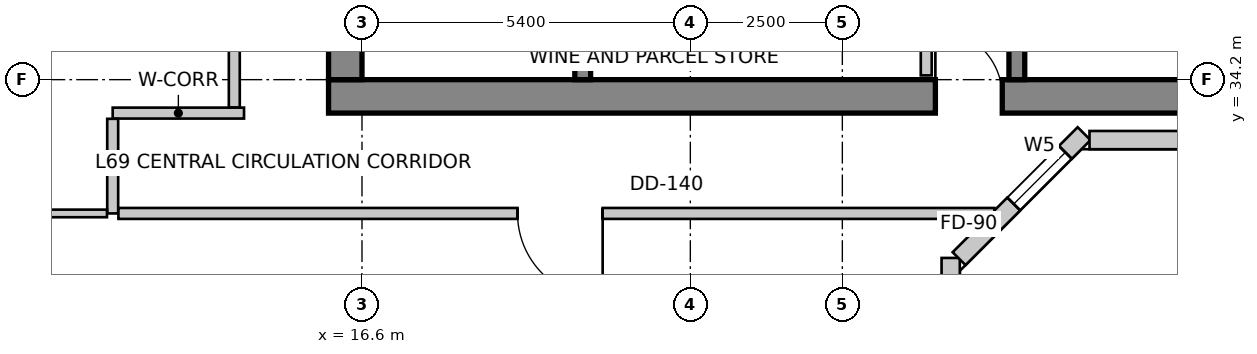
"""IFC4 building model, lengths in metres.
Left out: names, types, materials, properties, quantities, classifications, styles, units other than length and angle.
Written with IfcOpenShell. Run it as: python <this file> out.ifc"""

import sys

from ifc_helpers import new_model, si_unit, direction, frame, frame_2d, origin, place, context, subcontext, project, spatial, rectangle, extrude, source, transform, mapped, element, fill, save


model = new_model("IFC4")
c1 = context("Model", 3, precision=1e-05, world=origin(), true_north=direction((0.0, 1.0)))
c2 = subcontext(c1, "Body", "Model", "MODEL_VIEW")
j1 = project(units=[si_unit("LENGTHUNIT", "METRE"), si_unit("PLANEANGLEUNIT", "RADIAN")], contexts=[c1])
p1 = place(None, origin())
s1 = spatial("IfcSite", under=j1, at=p1, CompositionType="ELEMENT")
p2 = place(p1, origin())
s2 = spatial("IfcBuilding", under=s1, at=p2, CompositionType="ELEMENT")
p3 = place(p2, frame((0.0, 0.0, 270.9)))
s3 = spatial("IfcBuildingStorey", under=s2, at=p3, CompositionType="ELEMENT", Elevation=270.9)
p4 = place(p3, frame((16.05, 33.925, 0.0), z_axis=(0.0, 0.0, 1.0), x_axis=(1.0, 0.0, 0.0)))
e1 = element("IfcWall", 1, at=p4, inside=s3, PredefinedType="SHEAR", context=c2, shape_type="SweptSolid", body=[
    extrude(rectangle(XDim=15.5, YDim=0.55, at=frame_2d((7.75, 0.0))), origin(), (0.0, 0.0, 1.0), 3.6),
])
m1 = source(origin(), c2, "Body", "SweptSolid", [
    extrude(rectangle(XDim=1.1, YDim=2.15, at=frame_2d((0.55, 1.075))), frame((0.0, 0.285, 0.0), z_axis=(0.0, -1.0, 0.0), x_axis=(1.0, 0.0, 0.0)), (0.0, 0.0, 1.0), 0.57),
])
p5 = place(p4, frame((9.98, 0.0, 0.0)))
e2 = element("IfcOpeningElement", 2, at=p5, cuts=e1, PredefinedType="OPENING", context=c2, shape_type="MappedRepresentation", body=[
    mapped(m1, transform((0.0, 0.0, 0.0), scale=1.0)),
])
p6 = place(p3, frame((16.325, 34.2, 0.0), z_axis=(0.0, 0.0, 1.0), x_axis=(0.0, 1.0, 0.0)))
e3 = element("IfcWall", 3, at=p6, inside=s3, PredefinedType="SHEAR", context=c2, shape_type="SweptSolid", body=[
    extrude(rectangle(XDim=11.4, YDim=0.55, at=frame_2d((5.7, 0.0))), origin(), (0.0, 0.0, 1.0), 3.6),
])
p7 = place(p6, frame((7.15, 0.0, 0.0)))
e4 = element("IfcOpeningElement", 4, at=p7, cuts=e3, PredefinedType="OPENING", context=c2, shape_type="MappedRepresentation", body=[
    mapped(m1, transform((0.0, 0.0, 0.0), scale=1.0)),
])
p8 = place(p3, frame((20.23, 34.2, 0.0), z_axis=(0.0, 0.0, 1.0), x_axis=(0.0, 1.0, 0.0)))
e5 = element("IfcWall", 5, at=p8, inside=s3, PredefinedType="SHEAR", context=c2, shape_type="SweptSolid", body=[
    extrude(rectangle(XDim=9.06, YDim=0.26, at=frame_2d((4.53, 0.0))), origin(), (0.0, 0.0, 1.0), 3.6),
])
m2 = source(origin(), c2, "Body", "SweptSolid", [
    extrude(rectangle(XDim=1.1, YDim=2.15, at=frame_2d((0.55, 1.075))), frame((0.0, 0.14, 0.0), z_axis=(0.0, -1.0, 0.0), x_axis=(1.0, 0.0, 0.0)), (0.0, 0.0, 1.0), 0.28),
])
p9 = place(p8, frame((7.45, 0.0, 0.0)))
e6 = element("IfcOpeningElement", 6, at=p9, cuts=e5, PredefinedType="OPENING", context=c2, shape_type="MappedRepresentation", body=[
    mapped(m2, transform((0.0, 0.0, 0.0), scale=1.0)),
])
p10 = place(p3, frame((27.37, 34.2, 0.0), z_axis=(0.0, 0.0, 1.0), x_axis=(0.0, 1.0, 0.0)))
e7 = element("IfcWall", 7, at=p10, inside=s3, PredefinedType="SHEAR", context=c2, shape_type="SweptSolid", body=[
    extrude(rectangle(XDim=9.06, YDim=0.26, at=frame_2d((4.53, 0.0))), origin(), (0.0, 0.0, 1.0), 3.6),
])
p11 = place(p10, frame((7.45, 0.0, 0.0)))
e8 = element("IfcOpeningElement", 8, at=p11, cuts=e7, PredefinedType="OPENING", context=c2, shape_type="MappedRepresentation", body=[
    mapped(m2, transform((0.0, 0.0, 0.0), scale=1.0)),
])
p12 = place(p3, frame((26.282, 21.557, 0.0), z_axis=(0.0, 0.0, 1.0), x_axis=(0.0, 1.0, 0.0)))
e9 = element("IfcWall", 9, at=p12, inside=s3, PredefinedType="SOLIDWALL", context=c2, shape_type="SweptSolid", body=[
    extrude(rectangle(XDim=9.711, YDim=0.3, at=frame_2d((4.855, 0.0))), origin(), (0.0, 0.0, 1.0), 3.35),
])
m3 = source(origin(), c2, "Body", "SweptSolid", [
    extrude(rectangle(XDim=2.1, YDim=2.0, at=frame_2d((1.05, 1.0))), frame((0.0, 0.16, 0.0), z_axis=(0.0, -1.0, 0.0), x_axis=(1.0, 0.0, 0.0)), (0.0, 0.0, 1.0), 0.32),
])
p13 = place(p12, frame((0.504, 0.0, 0.85)))
e10 = element("IfcOpeningElement", 10, at=p13, cuts=e9, PredefinedType="OPENING", context=c2, shape_type="MappedRepresentation", body=[
    mapped(m3, transform((0.0, 0.0, 0.0), scale=1.0)),
])
p14 = place(p12, frame((5.259, 0.0, 0.85)))
e11 = element("IfcOpeningElement", 11, at=p14, cuts=e9, PredefinedType="OPENING", context=c2, shape_type="MappedRepresentation", body=[
    mapped(m3, transform((0.0, 0.0, 0.0), scale=1.0)),
])
p15 = place(p3, frame((26.42, 31.256, 0.0), z_axis=(0.0, 0.0, 1.0), x_axis=(0.707106781187, 0.707106781187, 0.0)))
e12 = element("IfcWall", 12, at=p15, inside=s3, PredefinedType="SOLIDWALL", context=c2, shape_type="SweptSolid", body=[
    extrude(rectangle(XDim=2.907, YDim=0.3, at=frame_2d((1.454, 0.0))), origin(), (0.0, 0.0, 1.0), 3.35),
])
m4 = source(origin(), c2, "Body", "SweptSolid", [
    extrude(rectangle(XDim=1.2, YDim=1.6, at=frame_2d((0.6, 0.8))), frame((0.0, 0.16, 0.0), z_axis=(0.0, -1.0, 0.0), x_axis=(1.0, 0.0, 0.0)), (0.0, 0.0, 1.0), 0.32),
])
p16 = place(p15, frame((1.272, 0.0, 0.85)))
e13 = element("IfcOpeningElement", 13, at=p16, cuts=e12, PredefinedType="OPENING", context=c2, shape_type="MappedRepresentation", body=[
    mapped(m4, transform((0.0, 0.0, 0.0), scale=1.0)),
])
p17 = place(p3, frame((28.565, 33.206, 0.0), z_axis=(0.0, 0.0, 1.0), x_axis=(1.0, 0.0, 0.0)))
e14 = element("IfcWall", 14, at=p17, inside=s3, PredefinedType="SOLIDWALL", context=c2, shape_type="SweptSolid", body=[
    extrude(rectangle(XDim=13.423, YDim=0.3, at=frame_2d((6.711, 0.0))), origin(), (0.0, 0.0, 1.0), 3.35),
])
m5 = source(origin(), c2, "Body", "SweptSolid", [
    extrude(rectangle(XDim=1.6, YDim=2.15, at=frame_2d((0.8, 1.075))), frame((0.0, 0.16, 0.0), z_axis=(0.0, -1.0, 0.0), x_axis=(1.0, 0.0, 0.0)), (0.0, 0.0, 1.0), 0.32),
])
p18 = place(p17, frame((5.635, 0.0, 0.0)))
e15 = element("IfcOpeningElement", 15, at=p18, cuts=e14, PredefinedType="OPENING", context=c2, shape_type="MappedRepresentation", body=[
    mapped(m5, transform((0.0, 0.0, 0.0), scale=1.0)),
])
p19 = place(p17, frame((1.787, 0.0, 0.85)))
e16 = element("IfcOpeningElement", 16, at=p19, cuts=e14, PredefinedType="OPENING", context=c2, shape_type="MappedRepresentation", body=[
    mapped(m3, transform((0.0, 0.0, 0.0), scale=1.0)),
])
p20 = place(p17, frame((9.259, 0.0, 0.85)))
e17 = element("IfcOpeningElement", 17, at=p20, cuts=e14, PredefinedType="OPENING", context=c2, shape_type="MappedRepresentation", body=[
    mapped(m3, transform((0.0, 0.0, 0.0), scale=1.0)),
])
p21 = place(p3, frame((25.88, 35.956, 0.0), z_axis=(0.0, 0.0, 1.0), x_axis=(0.0, -1.0, 0.0)))
e18 = element("IfcWall", 18, at=p21, inside=s3, PredefinedType="PARTITIONING", context=c2, shape_type="SweptSolid", body=[
    extrude(rectangle(XDim=1.686, YDim=0.18, at=frame_2d((0.843, 0.0))), origin(), (0.0, 0.0, 1.0), 2.642),
])
p22 = place(p3, frame((12.5, 33.65, 0.0), z_axis=(0.0, 0.0, 1.0), x_axis=(1.0, 0.0, 0.0)))
e19 = element("IfcWall", 19, at=p22, inside=s3, PredefinedType="PARTITIONING", context=c2, shape_type="SweptSolid", body=[
    extrude(rectangle(XDim=2.16, YDim=0.18, at=frame_2d((1.08, 0.0))), origin(), (0.0, 0.0, 1.0), 3.35),
])
p23 = place(p3, frame((12.5, 32.0, 0.0), z_axis=(0.0, 0.0, 1.0), x_axis=(0.0, 1.0, 0.0)))
e20 = element("IfcWall", 20, at=p23, inside=s3, PredefinedType="PARTITIONING", context=c2, shape_type="SweptSolid", body=[
    extrude(rectangle(XDim=1.556, YDim=0.18, at=frame_2d((0.778, 0.0))), origin(), (0.0, 0.0, 1.0), 2.935),
])
p24 = place(p3, frame((27.001, 32.0, 0.0), z_axis=(0.0, 0.0, 1.0), x_axis=(-1.0, 0.0, 0.0)))
e21 = element("IfcWall", 21, at=p24, inside=s3, PredefinedType="PARTITIONING", context=c2, shape_type="SweptSolid", body=[
    extrude(rectangle(XDim=14.407, YDim=0.18, at=frame_2d((7.204, 0.0))), origin(), (0.0, 0.0, 1.0), 2.935),
])
m6 = source(origin(), c2, "Body", "SweptSolid", [
    extrude(rectangle(XDim=1.4, YDim=2.15, at=frame_2d((0.7, 1.075))), frame((0.0, 0.1, 0.0), z_axis=(0.0, -1.0, 0.0), x_axis=(1.0, 0.0, 0.0)), (0.0, 0.0, 1.0), 0.2),
])
p25 = place(p24, frame((6.443, 0.0, 0.0)))
e22 = element("IfcOpeningElement", 22, at=p25, cuts=e21, PredefinedType="OPENING", context=c2, shape_type="MappedRepresentation", body=[
    mapped(m6, transform((0.0, 0.0, 0.0), scale=1.0)),
])
p26 = place(p3, frame((14.5, 33.744, 0.0), z_axis=(0.0, 0.0, 1.0), x_axis=(0.0, 1.0, 0.0)))
e23 = element("IfcWall", 23, at=p26, inside=s3, PredefinedType="PARTITIONING", context=c2, shape_type="SweptSolid", body=[
    extrude(rectangle(XDim=12.406, YDim=0.18, at=frame_2d((6.203, 0.0))), origin(), (0.0, 0.0, 1.0), 3.35),
])
m7 = source(origin(), c2, "Body", "SweptSolid", [
    extrude(rectangle(XDim=0.9, YDim=2.15, at=frame_2d((0.45, 1.075))), frame((0.0, 0.1, 0.0), z_axis=(0.0, -1.0, 0.0), x_axis=(1.0, 0.0, 0.0)), (0.0, 0.0, 1.0), 0.2),
])
p27 = place(p26, frame((4.37, 0.0, 0.0)))
e24 = element("IfcOpeningElement", 24, at=p27, cuts=e23, PredefinedType="OPENING", context=c2, shape_type="MappedRepresentation", body=[
    mapped(m7, transform((0.0, 0.0, 0.0), scale=1.0)),
])
p28 = place(p3, frame((12.406, 32.0, 0.0), z_axis=(0.0, 0.0, 1.0), x_axis=(-1.0, 0.0, 0.0)))
e25 = element("IfcWall", 25, at=p28, inside=s3, PredefinedType="PARTITIONING", context=c2, shape_type="SweptSolid", body=[
    extrude(rectangle(XDim=4.126, YDim=0.125, at=frame_2d((2.063, 0.0))), origin(), (0.0, 0.0, 1.0), 2.642),
])
m8 = source(origin(), c2, "Body", "SweptSolid", [
    extrude(rectangle(XDim=1.2, YDim=1.6, at=frame_2d((0.6, 0.8))), frame((0.0, -0.015, 0.0), z_axis=(0.0, -1.0, 0.0), x_axis=(1.0, 0.0, 0.0)), (0.0, 0.0, 1.0), 0.06),
])
p29 = place(p16, origin())
e26 = element("IfcWindow", 26, at=p29, inside=s3, PartitioningType="SINGLE_PANEL", PredefinedType="WINDOW", context=c2, shape_type="MappedRepresentation", body=[
    mapped(m8, transform((0.0, 0.0, 0.0), scale=1.0)),
])
fill(e13, e26)
m9 = source(origin(), c2, "Body", "SweptSolid", [
    extrude(rectangle(XDim=1.1, YDim=2.15, at=frame_2d((0.55, 1.075))), frame((0.0, 0.025, 0.0), z_axis=(0.0, -1.0, 0.0), x_axis=(1.0, 0.0, 0.0)), (0.0, 0.0, 1.0), 0.05),
])
p30 = place(p5, origin())
e27 = element("IfcDoor", 27, at=p30, inside=s3, OperationType="SINGLE_SWING_LEFT", PredefinedType="DOOR", context=c2, shape_type="MappedRepresentation", body=[
    mapped(m9, transform((0.0, 0.0, 0.0), scale=1.0)),
])
fill(e2, e27)
m10 = source(origin(), c2, "Body", "SweptSolid", [
    extrude(rectangle(XDim=1.4, YDim=2.15, at=frame_2d((0.7, 1.075))), frame((0.0, 0.025, 0.0), z_axis=(0.0, -1.0, 0.0), x_axis=(1.0, 0.0, 0.0)), (0.0, 0.0, 1.0), 0.05),
])
p31 = place(p25, origin())
e28 = element("IfcDoor", 28, at=p31, inside=s3, OperationType="SINGLE_SWING_LEFT", PredefinedType="DOOR", context=c2, shape_type="MappedRepresentation", body=[
    mapped(m10, transform((0.0, 0.0, 0.0), scale=1.0)),
])
fill(e22, e28)
save(model, sys.argv[1])
